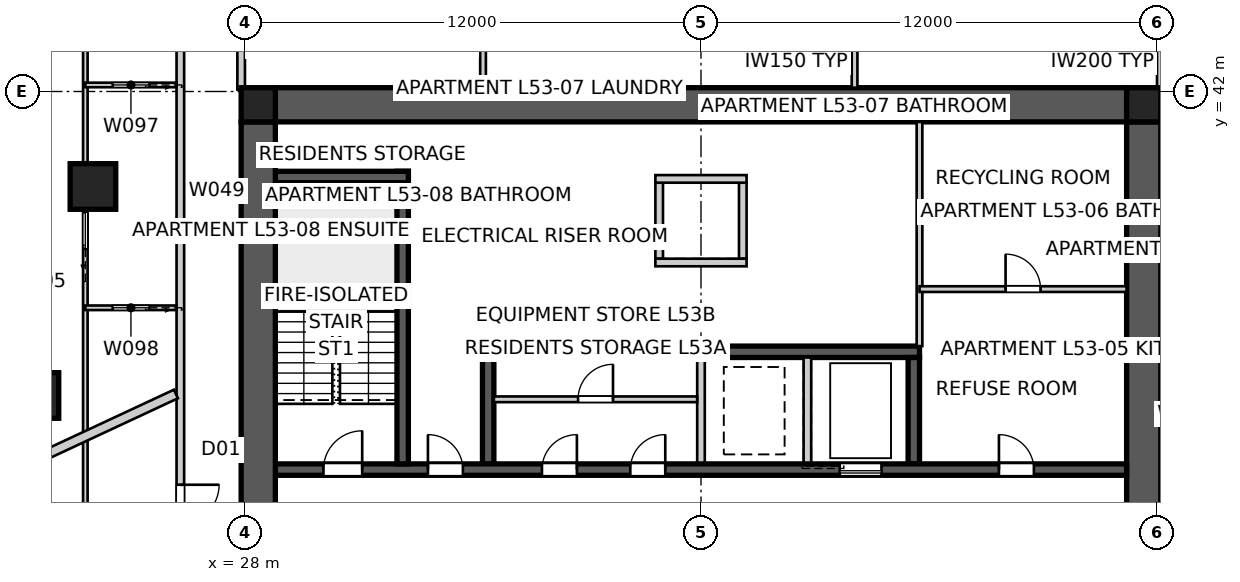
"""IFC4 building model, lengths in metres.
Left out: names, types, materials, properties, quantities, classifications, styles, units other than length and angle.
Written with IfcOpenShell. Run it as: python <this file> out.ifc"""

import sys

from ifc_helpers import new_model, si_unit, direction, frame, frame_2d, origin, origin_2d, place, context, subcontext, project, spatial, polyline, rectangle, outline, extrude, element, fill, save


model = new_model("IFC4")
c1 = context("Model", 3, precision=1e-05, world=origin(), true_north=direction((0.0, 1.0)))
c2 = subcontext(c1, "Body", "Model", "MODEL_VIEW")
j1 = project(units=[si_unit("LENGTHUNIT", "METRE"), si_unit("PLANEANGLEUNIT", "RADIAN")], contexts=[c1])
p1 = place(None, origin())
s1 = spatial("IfcSite", under=j1, at=p1, CompositionType="ELEMENT")
p2 = place(p1, origin())
s2 = spatial("IfcBuilding", under=s1, at=p2, CompositionType="ELEMENT")
p3 = place(p2, frame((0.0, 0.0, 193.0)))
s3 = spatial("IfcBuildingStorey", under=s2, at=p3, CompositionType="ELEMENT", Elevation=193.0)
p4 = place(p3, frame((28.8, 41.65, 0.0), z_axis=(0.0, 0.0, 1.0), x_axis=(1.0, 0.0, 0.0)))
e1 = element("IfcWall", 1, at=p4, inside=s3, PredefinedType="SHEAR", context=c2, shape_type="SweptSolid", body=[
    extrude(outline(polyline([(0.0, -0.45), (22.4, -0.45), (22.4, -0.025), (22.85, -0.025), (22.85, 0.025), (22.4, 0.025), (22.4, 0.45), (0.0, 0.45), (0.0, 0.025), (-0.45, 0.025), (-0.45, -0.025), (0.0, -0.025), (0.0, -0.45)])), origin(), (0.0, 0.0, 1.0), 3.4),
])
p5 = place(p3, frame((51.65, 18.8, 0.0), z_axis=(0.0, 0.0, 1.0), x_axis=(0.0, 1.0, 0.0)))
e2 = element("IfcWall", 2, at=p5, inside=s3, PredefinedType="SHEAR", context=c2, shape_type="SweptSolid", body=[
    extrude(outline(polyline([(0.0, -0.45), (22.4, -0.45), (22.4, -0.025), (22.85, -0.025), (22.85, 0.025), (22.4, 0.025), (22.4, 0.45), (0.0, 0.45), (0.0, 0.025), (-0.45, 0.025), (-0.45, -0.025), (0.0, -0.025), (0.0, -0.45)])), origin(), (0.0, 0.0, 1.0), 3.4),
])
p6 = place(p5, frame((11.14, 0.0, 0.0)))
e3 = element("IfcOpeningElement", 3, at=p6, cuts=e2, PredefinedType="OPENING", context=c2, shape_type="SweptSolid", body=[
    extrude(rectangle(XDim=1.02, YDim=2.4, at=frame_2d((0.51, 1.2))), frame((0.0, 0.46, 0.0), z_axis=(0.0, -1.0, 0.0), x_axis=(1.0, 0.0, 0.0)), (0.0, 0.0, 1.0), 0.92),
])
p7 = place(p3, frame((28.35, 41.2, 0.0), z_axis=(0.0, 0.0, 1.0), x_axis=(0.0, -1.0, 0.0)))
e4 = element("IfcWall", 4, at=p7, inside=s3, PredefinedType="SHEAR", context=c2, shape_type="SweptSolid", body=[
    extrude(outline(polyline([(0.0, -0.45), (22.4, -0.45), (22.4, -0.025), (22.85, -0.025), (22.85, 0.025), (22.4, 0.025), (22.4, 0.45), (0.0, 0.45), (0.0, 0.025), (-0.45, 0.025), (-0.45, -0.025), (0.0, -0.025), (0.0, -0.45)])), origin(), (0.0, 0.0, 1.0), 3.4),
])
p8 = place(p7, frame((11.14, 0.0, 0.0)))
e5 = element("IfcOpeningElement", 5, at=p8, cuts=e4, PredefinedType="OPENING", context=c2, shape_type="SweptSolid", body=[
    extrude(rectangle(XDim=1.02, YDim=2.4, at=frame_2d((0.51, 1.2))), frame((0.0, 0.46, 0.0), z_axis=(0.0, -1.0, 0.0), x_axis=(1.0, 0.0, 0.0)), (0.0, 0.0, 1.0), 0.92),
])
p9 = place(p3, frame((28.8, 32.05, 0.0), z_axis=(0.0, 0.0, 1.0), x_axis=(1.0, 0.0, 0.0)))
e6 = element("IfcWall", 6, at=p9, inside=s3, PredefinedType="SHEAR", context=c2, shape_type="SweptSolid", body=[
    extrude(rectangle(XDim=22.4, YDim=0.3, at=frame_2d((11.2, 0.0))), origin(), (0.0, 0.0, 1.0), 3.4),
])
p10 = place(p9, frame((19.04, 0.0, 0.0)))
e7 = element("IfcOpeningElement", 7, at=p10, cuts=e6, PredefinedType="OPENING", context=c2, shape_type="SweptSolid", body=[
    extrude(rectangle(XDim=0.92, YDim=2.1, at=frame_2d((0.46, 1.05))), frame((0.0, 0.16, 0.0), z_axis=(0.0, -1.0, 0.0), x_axis=(1.0, 0.0, 0.0)), (0.0, 0.0, 1.0), 0.32),
])
p11 = place(p9, frame((1.265, 0.0, 0.0)))
e8 = element("IfcOpeningElement", 8, at=p11, cuts=e6, PredefinedType="OPENING", context=c2, shape_type="SweptSolid", body=[
    extrude(rectangle(XDim=1.02, YDim=2.1, at=frame_2d((0.51, 1.05))), frame((0.0, 0.16, 0.0), z_axis=(0.0, -1.0, 0.0), x_axis=(1.0, 0.0, 0.0)), (0.0, 0.0, 1.0), 0.32),
])
p12 = place(p9, frame((4.015, 0.0, 0.0)))
e9 = element("IfcOpeningElement", 9, at=p12, cuts=e6, PredefinedType="OPENING", context=c2, shape_type="SweptSolid", body=[
    extrude(rectangle(XDim=0.92, YDim=2.1, at=frame_2d((0.46, 1.05))), frame((0.0, 0.16, 0.0), z_axis=(0.0, -1.0, 0.0), x_axis=(1.0, 0.0, 0.0)), (0.0, 0.0, 1.0), 0.32),
])
p13 = place(p9, frame((7.015, 0.0, 0.0)))
e10 = element("IfcOpeningElement", 10, at=p13, cuts=e6, PredefinedType="OPENING", context=c2, shape_type="SweptSolid", body=[
    extrude(rectangle(XDim=0.92, YDim=2.1, at=frame_2d((0.46, 1.05))), frame((0.0, 0.16, 0.0), z_axis=(0.0, -1.0, 0.0), x_axis=(1.0, 0.0, 0.0)), (0.0, 0.0, 1.0), 0.32),
])
p14 = place(p9, frame((9.34, 0.0, 0.0)))
e11 = element("IfcOpeningElement", 11, at=p14, cuts=e6, PredefinedType="OPENING", context=c2, shape_type="SweptSolid", body=[
    extrude(rectangle(XDim=0.92, YDim=2.1, at=frame_2d((0.46, 1.05))), frame((0.0, 0.16, 0.0), z_axis=(0.0, -1.0, 0.0), x_axis=(1.0, 0.0, 0.0)), (0.0, 0.0, 1.0), 0.32),
])
p15 = place(p9, frame((14.85, 0.0, 0.0)))
e12 = element("IfcOpeningElement", 12, at=p15, cuts=e6, PredefinedType="OPENING", context=c2, shape_type="SweptSolid", body=[
    extrude(rectangle(XDim=1.1, YDim=2.1, at=frame_2d((0.55, 1.05))), frame((0.0, 0.16, 0.0), z_axis=(0.0, -1.0, 0.0), x_axis=(1.0, 0.0, 0.0)), (0.0, 0.0, 1.0), 0.32),
])
p16 = place(p3, frame((34.25, 35.15, 0.0), z_axis=(0.0, 0.0, 1.0), x_axis=(1.0, 0.0, 0.0)))
e13 = element("IfcWall", 13, at=p16, inside=s3, PredefinedType="SHEAR", context=c2, shape_type="SweptSolid", body=[
    extrude(rectangle(XDim=11.5, YDim=0.3, at=frame_2d((5.75, 0.0))), origin(), (0.0, 0.0, 1.0), 3.4),
])
p17 = place(p3, frame((34.4, 32.2, 0.0), z_axis=(0.0, 0.0, 1.0), x_axis=(0.0, 1.0, 0.0)))
e14 = element("IfcWall", 14, at=p17, inside=s3, PredefinedType="SHEAR", context=c2, shape_type="SweptSolid", body=[
    extrude(rectangle(XDim=2.8, YDim=0.3, at=frame_2d((1.4, 0.0))), origin(), (0.0, 0.0, 1.0), 3.4),
])
for number, where, z_axis, x_axis in (
    (15, (40.0, 32.2, 0.0), (0.0, 0.0, 1.0), (0.0, 1.0, 0.0)),
    (16, (42.8, 32.2, 0.0), (0.0, 0.0, 1.0), (0.0, 1.0, 0.0)),
):
    element("IfcWall", number, at=place(p3, frame(where, z_axis=z_axis, x_axis=x_axis)), inside=s3, PredefinedType="SOLIDWALL", context=c2, shape_type="SweptSolid", body=[
        extrude(rectangle(XDim=2.8, YDim=0.2, at=frame_2d((1.4, 0.0))), origin(), (0.0, 0.0, 1.0), 3.4),
    ])
p18 = place(p3, frame((45.6, 32.2, 0.0), z_axis=(0.0, 0.0, 1.0), x_axis=(0.0, 1.0, 0.0)))
e17 = element("IfcWall", 17, at=p18, inside=s3, PredefinedType="SHEAR", context=c2, shape_type="SweptSolid", body=[
    extrude(rectangle(XDim=2.8, YDim=0.3, at=frame_2d((1.4, 0.0))), origin(), (0.0, 0.0, 1.0), 3.4),
])
p19 = place(p3, frame((32.15, 32.2, 0.0), z_axis=(0.0, 0.0, 1.0), x_axis=(0.0, 1.0, 0.0)))
e18 = element("IfcWall", 18, at=p19, inside=s3, PredefinedType="SHEAR", context=c2, shape_type="SweptSolid", body=[
    extrude(rectangle(XDim=7.7, YDim=0.3, at=frame_2d((3.85, 0.0))), origin(), (0.0, 0.0, 1.0), 3.4),
])
p20 = place(p3, frame((28.8, 39.75, 0.0), z_axis=(0.0, 0.0, 1.0), x_axis=(1.0, 0.0, 0.0)))
e19 = element("IfcWall", 19, at=p20, inside=s3, PredefinedType="SHEAR", context=c2, shape_type="SweptSolid", body=[
    extrude(rectangle(XDim=3.5, YDim=0.3, at=frame_2d((1.75, 0.0))), origin(), (0.0, 0.0, 1.0), 3.4),
])
for number, where, z_axis, x_axis in (
    (20, (38.9, 37.6, 0.0), (0.0, 0.0, 1.0), (0.0, 1.0, 0.0)),
    (21, (41.1, 37.6, 0.0), (0.0, 0.0, 1.0), (0.0, 1.0, 0.0)),
):
    element("IfcWall", number, at=place(p3, frame(where, z_axis=z_axis, x_axis=x_axis)), inside=s3, PredefinedType="SOLIDWALL", context=c2, shape_type="SweptSolid", body=[
        extrude(rectangle(XDim=2.0, YDim=0.2, at=frame_2d((1.0, 0.0))), origin(), (0.0, 0.0, 1.0), 3.4),
    ])
for number, where, z_axis, x_axis in (
    (22, (38.8, 37.5, 0.0), (0.0, 0.0, 1.0), (1.0, 0.0, 0.0)),
    (23, (38.8, 39.7, 0.0), (0.0, 0.0, 1.0), (1.0, 0.0, 0.0)),
):
    element("IfcWall", number, at=place(p3, frame(where, z_axis=z_axis, x_axis=x_axis)), inside=s3, PredefinedType="SOLIDWALL", context=c2, shape_type="SweptSolid", body=[
        extrude(rectangle(XDim=2.4, YDim=0.2, at=frame_2d((1.2, 0.0))), origin(), (0.0, 0.0, 1.0), 3.4),
    ])
for number, where, z_axis, x_axis in (
    (24, (51.65, 41.65, 0.0), (0.0, 0.0, 1.0), (1.0, 0.0, 0.0)),
    (25, (28.35, 41.65, 0.0), (0.0, 0.0, 1.0), (1.0, 0.0, 0.0)),
):
    element("IfcColumn", number, at=place(p3, frame(where, z_axis=z_axis, x_axis=x_axis)), inside=s3, PredefinedType="COLUMN", context=c2, shape_type="SweptSolid", body=[
        extrude(rectangle(XDim=0.9, YDim=0.9, at=origin_2d()), origin(), (0.0, 0.0, 1.0), 3.4),
    ])
for number, where, z_axis, x_axis in (
    (26, (24.0, 39.5, 0.0), (0.0, 0.0, 1.0), (1.0, 0.0, 0.0)),
    (27, (22.5, 34.0, 0.0), (0.0, 0.0, 1.0), (1.0, 0.0, 0.0)),
):
    element("IfcColumn", number, at=place(p3, frame(where, z_axis=z_axis, x_axis=x_axis)), inside=s3, PredefinedType="COLUMN", context=c2, shape_type="SweptSolid", body=[
        extrude(rectangle(XDim=1.2, YDim=1.2, at=origin_2d()), origin(), (0.0, 0.0, 1.0), 3.4),
    ])
p21 = place(p3, frame((26.3, 47.1, 0.0), z_axis=(0.0, 0.0, 1.0), x_axis=(0.0, -1.0, 0.0)))
e28 = element("IfcWall", 28, at=p21, inside=s3, PredefinedType="PARTITIONING", context=c2, shape_type="SweptSolid", body=[
    extrude(rectangle(XDim=33.8, YDim=0.2, at=frame_2d((16.9, 0.0))), origin(), (0.0, 0.0, 1.0), 3.25),
])
p22 = place(p21, frame((15.449, 0.0, 0.0)))
e29 = element("IfcOpeningElement", 29, at=p22, cuts=e28, PredefinedType="OPENING", context=c2, shape_type="SweptSolid", body=[
    extrude(rectangle(XDim=1.02, YDim=2.34, at=frame_2d((0.51, 1.17))), frame((0.0, 0.11, 0.0), z_axis=(0.0, -1.0, 0.0), x_axis=(1.0, 0.0, 0.0)), (0.0, 0.0, 1.0), 0.22),
])
p23 = place(p21, frame((30.883, 0.0, 0.0)))
e30 = element("IfcOpeningElement", 30, at=p23, cuts=e28, PredefinedType="OPENING", context=c2, shape_type="SweptSolid", body=[
    extrude(rectangle(XDim=1.02, YDim=2.34, at=frame_2d((0.51, 1.17))), frame((0.0, 0.11, 0.0), z_axis=(0.0, -1.0, 0.0), x_axis=(1.0, 0.0, 0.0)), (0.0, 0.0, 1.0), 0.22),
])
p24 = place(p3, frame((15.14, 28.89, 0.0), z_axis=(0.0, 0.0, 1.0), x_axis=(0.906303906082, 0.422626584374, 0.0)))
e31 = element("IfcWall", 31, at=p24, inside=s3, PredefinedType="PARTITIONING", context=c2, shape_type="SweptSolid", body=[
    extrude(rectangle(XDim=12.185, YDim=0.25, at=frame_2d((6.092, 0.0))), origin(), (0.0, 0.0, 1.0), 3.25),
])
p25 = place(p3, frame((45.75, 41.2, 0.0), z_axis=(0.0, 0.0, 1.0), x_axis=(0.0, -1.0, 0.0)))
e32 = element("IfcWall", 32, at=p25, inside=s3, PredefinedType="SOLIDWALL", context=c2, shape_type="SweptSolid", body=[
    extrude(rectangle(XDim=5.9, YDim=0.15, at=frame_2d((2.95, 0.0))), origin(), (0.0, 0.0, 1.0), 3.25),
])
p26 = place(p3, frame((45.75, 36.8, 0.0), z_axis=(0.0, 0.0, 1.0), x_axis=(1.0, 0.0, 0.0)))
e33 = element("IfcWall", 33, at=p26, inside=s3, PredefinedType="SOLIDWALL", context=c2, shape_type="SweptSolid", body=[
    extrude(rectangle(XDim=5.45, YDim=0.15, at=frame_2d((2.725, 0.0))), origin(), (0.0, 0.0, 1.0), 3.25),
])
p27 = place(p26, frame((2.265, 0.0, 0.0)))
e34 = element("IfcOpeningElement", 34, at=p27, cuts=e33, PredefinedType="OPENING", context=c2, shape_type="SweptSolid", body=[
    extrude(rectangle(XDim=0.92, YDim=2.1, at=frame_2d((0.46, 1.05))), frame((0.0, 0.085, 0.0), z_axis=(0.0, -1.0, 0.0), x_axis=(1.0, 0.0, 0.0)), (0.0, 0.0, 1.0), 0.17),
])
p28 = place(p3, frame((27.9, 44.35, 0.0), z_axis=(0.0, 0.0, 1.0), x_axis=(0.0, -1.0, 0.0)))
e35 = element("IfcWall", 35, at=p28, inside=s3, PredefinedType="PARTITIONING", context=c2, shape_type="SweptSolid", body=[
    extrude(rectangle(XDim=2.3, YDim=0.2, at=frame_2d((1.15, 0.0))), origin(), (0.0, 0.0, 1.0), 3.25),
])
p29 = place(p3, frame((52.1, 41.18, 0.0), z_axis=(0.0, 0.0, 1.0), x_axis=(0.0, 1.0, 0.0)))
e36 = element("IfcWall", 36, at=p29, inside=s3, PredefinedType="PARTITIONING", context=c2, shape_type="SweptSolid", body=[
    extrude(rectangle(XDim=3.17, YDim=0.2, at=frame_2d((1.585, 0.0))), origin(), (0.0, 0.0, 1.0), 3.25),
])
p30 = place(p3, frame((34.265, 42.1, 0.0), z_axis=(0.0, 0.0, 1.0), x_axis=(0.0, 1.0, 0.0)))
e37 = element("IfcWall", 37, at=p30, inside=s3, PredefinedType="SOLIDWALL", context=c2, shape_type="SweptSolid", body=[
    extrude(rectangle(XDim=2.25, YDim=0.15, at=frame_2d((1.125, 0.0))), origin(), (0.0, 0.0, 1.0), 2.796),
])
p31 = place(p3, frame((44.042, 42.1, 0.0), z_axis=(0.0, 0.0, 1.0), x_axis=(0.0, 1.0, 0.0)))
e38 = element("IfcWall", 38, at=p31, inside=s3, PredefinedType="SOLIDWALL", context=c2, shape_type="SweptSolid", body=[
    extrude(rectangle(XDim=2.25, YDim=0.15, at=frame_2d((1.125, 0.0))), origin(), (0.0, 0.0, 1.0), 3.25),
])
p32 = place(p3, frame((23.8, 17.205, 0.0), z_axis=(0.0, 0.0, 1.0), x_axis=(0.0, 1.0, 0.0)))
e39 = element("IfcWall", 39, at=p32, inside=s3, PredefinedType="PARTITIONING", context=c2, shape_type="SweptSolid", body=[
    extrude(rectangle(XDim=30.574, YDim=0.12, at=frame_2d((15.287, 0.0))), origin(), (0.0, 0.0, 1.0), 2.55),
])
p33 = place(p32, frame((12.857, 0.0, 0.0)))
e40 = element("IfcOpeningElement", 40, at=p33, cuts=e39, PredefinedType="OPENING", context=c2, shape_type="SweptSolid", body=[
    extrude(rectangle(XDim=0.92, YDim=2.34, at=frame_2d((0.46, 1.17))), frame((0.0, 0.07, 0.0), z_axis=(0.0, -1.0, 0.0), x_axis=(1.0, 0.0, 0.0)), (0.0, 0.0, 1.0), 0.14),
])
p34 = place(p32, frame((28.042, 0.0, 0.0)))
e41 = element("IfcOpeningElement", 41, at=p34, cuts=e39, PredefinedType="OPENING", context=c2, shape_type="SweptSolid", body=[
    extrude(rectangle(XDim=0.92, YDim=2.34, at=frame_2d((0.46, 1.17))), frame((0.0, 0.07, 0.0), z_axis=(0.0, -1.0, 0.0), x_axis=(1.0, 0.0, 0.0)), (0.0, 0.0, 1.0), 0.14),
])
p35 = place(p32, frame((20.655, 0.0, 0.0)))
e42 = element("IfcOpeningElement", 42, at=p35, cuts=e39, PredefinedType="OPENING", context=c2, shape_type="SweptSolid", body=[
    extrude(rectangle(XDim=0.96, YDim=2.1, at=frame_2d((0.48, 1.05))), frame((0.0, 0.07, 0.0), z_axis=(0.0, -1.0, 0.0), x_axis=(1.0, 0.0, 0.0)), (0.0, 0.0, 1.0), 0.14),
])
p36 = place(p3, frame((26.2, 42.172, 0.0), z_axis=(0.0, 0.0, 1.0), x_axis=(-1.0, 0.0, 0.0)))
e43 = element("IfcWall", 43, at=p36, inside=s3, PredefinedType="PARTITIONING", context=c2, shape_type="SweptSolid", body=[
    extrude(rectangle(XDim=2.4, YDim=0.12, at=frame_2d((1.2, 0.0))), origin(), (0.0, 0.0, 1.0), 3.25),
])
p37 = place(p36, frame((0.72, 0.0, 0.0)))
e44 = element("IfcOpeningElement", 44, at=p37, cuts=e43, PredefinedType="OPENING", context=c2, shape_type="SweptSolid", body=[
    extrude(rectangle(XDim=0.96, YDim=2.1, at=frame_2d((0.48, 1.05))), frame((0.0, 0.07, 0.0), z_axis=(0.0, -1.0, 0.0), x_axis=(1.0, 0.0, 0.0)), (0.0, 0.0, 1.0), 0.14),
])
p38 = place(p3, frame((26.2, 36.308, 0.0), z_axis=(0.0, 0.0, 1.0), x_axis=(-1.0, 0.0, 0.0)))
e45 = element("IfcWall", 45, at=p38, inside=s3, PredefinedType="PARTITIONING", context=c2, shape_type="SweptSolid", body=[
    extrude(rectangle(XDim=2.4, YDim=0.12, at=frame_2d((1.2, 0.0))), origin(), (0.0, 0.0, 1.0), 3.25),
])
p39 = place(p38, frame((0.72, 0.0, 0.0)))
e46 = element("IfcOpeningElement", 46, at=p39, cuts=e45, PredefinedType="OPENING", context=c2, shape_type="SweptSolid", body=[
    extrude(rectangle(XDim=0.96, YDim=2.1, at=frame_2d((0.48, 1.05))), frame((0.0, 0.07, 0.0), z_axis=(0.0, -1.0, 0.0), x_axis=(1.0, 0.0, 0.0)), (0.0, 0.0, 1.0), 0.14),
])
p40 = place(p3, frame((18.965, 41.391, 0.0), z_axis=(0.0, 0.0, 1.0), x_axis=(0.906312880264, 0.422607339108, 0.0)))
e47 = element("IfcWall", 47, at=p40, inside=s3, PredefinedType="PARTITIONING", context=c2, shape_type="SweptSolid", body=[
    extrude(rectangle(XDim=5.334, YDim=0.12, at=frame_2d((2.667, 0.0))), origin(), (0.0, 0.0, 1.0), 3.25),
])
p41 = place(p3, frame((34.55, 33.9, 0.0), z_axis=(0.0, 0.0, 1.0), x_axis=(1.0, 0.0, 0.0)))
e48 = element("IfcWall", 48, at=p41, inside=s3, PredefinedType="SOLIDWALL", context=c2, shape_type="SweptSolid", body=[
    extrude(rectangle(XDim=5.35, YDim=0.15, at=frame_2d((2.675, 0.0))), origin(), (0.0, 0.0, 1.0), 3.25),
])
p42 = place(p41, frame((2.215, 0.0, 0.0)))
e49 = element("IfcOpeningElement", 49, at=p42, cuts=e48, PredefinedType="OPENING", context=c2, shape_type="SweptSolid", body=[
    extrude(rectangle(XDim=0.92, YDim=2.1, at=frame_2d((0.46, 1.05))), frame((0.0, 0.085, 0.0), z_axis=(0.0, -1.0, 0.0), x_axis=(1.0, 0.0, 0.0)), (0.0, 0.0, 1.0), 0.17),
])
p43 = place(p10, origin())
e50 = element("IfcDoor", 50, at=p43, inside=s3, OperationType="SINGLE_SWING_LEFT", PredefinedType="DOOR", context=c2, shape_type="SweptSolid", body=[
    extrude(rectangle(XDim=0.92, YDim=2.1, at=frame_2d((0.46, 1.05))), frame((0.0, 0.025, 0.0), z_axis=(0.0, -1.0, 0.0), x_axis=(1.0, 0.0, 0.0)), (0.0, 0.0, 1.0), 0.05),
])
fill(e7, e50)
p44 = place(p11, origin())
e51 = element("IfcDoor", 51, at=p44, inside=s3, OperationType="SINGLE_SWING_RIGHT", PredefinedType="DOOR", context=c2, shape_type="SweptSolid", body=[
    extrude(rectangle(XDim=1.02, YDim=2.1, at=frame_2d((0.51, 1.05))), frame((0.0, 0.025, 0.0), z_axis=(0.0, -1.0, 0.0), x_axis=(1.0, 0.0, 0.0)), (0.0, 0.0, 1.0), 0.05),
])
fill(e8, e51)
p45 = place(p12, origin())
e52 = element("IfcDoor", 52, at=p45, inside=s3, OperationType="SINGLE_SWING_LEFT", PredefinedType="DOOR", context=c2, shape_type="SweptSolid", body=[
    extrude(rectangle(XDim=0.92, YDim=2.1, at=frame_2d((0.46, 1.05))), frame((0.0, 0.025, 0.0), z_axis=(0.0, -1.0, 0.0), x_axis=(1.0, 0.0, 0.0)), (0.0, 0.0, 1.0), 0.05),
])
fill(e9, e52)
p46 = place(p22, origin())
e53 = element("IfcDoor", 53, at=p46, inside=s3, OperationType="SINGLE_SWING_LEFT", PredefinedType="DOOR", context=c2, shape_type="SweptSolid", body=[
    extrude(rectangle(XDim=1.02, YDim=2.34, at=frame_2d((0.51, 1.17))), frame((0.0, 0.025, 0.0), z_axis=(0.0, -1.0, 0.0), x_axis=(1.0, 0.0, 0.0)), (0.0, 0.0, 1.0), 0.05),
])
fill(e29, e53)
p47 = place(p27, origin())
e54 = element("IfcDoor", 54, at=p47, inside=s3, OperationType="SINGLE_SWING_LEFT", PredefinedType="DOOR", context=c2, shape_type="SweptSolid", body=[
    extrude(rectangle(XDim=0.92, YDim=2.1, at=frame_2d((0.46, 1.05))), frame((0.0, 0.025, 0.0), z_axis=(0.0, -1.0, 0.0), x_axis=(1.0, 0.0, 0.0)), (0.0, 0.0, 1.0), 0.05),
])
fill(e34, e54)
p48 = place(p37, origin())
e55 = element("IfcDoor", 55, at=p48, inside=s3, OperationType="SLIDING_TO_LEFT", PredefinedType="DOOR", context=c2, shape_type="SweptSolid", body=[
    extrude(rectangle(XDim=0.96, YDim=2.1, at=frame_2d((0.48, 1.05))), frame((0.0, 0.025, 0.0), z_axis=(0.0, -1.0, 0.0), x_axis=(1.0, 0.0, 0.0)), (0.0, 0.0, 1.0), 0.05),
])
fill(e44, e55)
p49 = place(p35, origin())
e56 = element("IfcDoor", 56, at=p49, inside=s3, OperationType="SLIDING_TO_LEFT", PredefinedType="DOOR", context=c2, shape_type="SweptSolid", body=[
    extrude(rectangle(XDim=0.96, YDim=2.1, at=frame_2d((0.48, 1.05))), frame((0.0, 0.025, 0.0), z_axis=(0.0, -1.0, 0.0), x_axis=(1.0, 0.0, 0.0)), (0.0, 0.0, 1.0), 0.05),
])
fill(e42, e56)
p50 = place(p39, origin())
e57 = element("IfcDoor", 57, at=p50, inside=s3, OperationType="SLIDING_TO_LEFT", PredefinedType="DOOR", context=c2, shape_type="SweptSolid", body=[
    extrude(rectangle(XDim=0.96, YDim=2.1, at=frame_2d((0.48, 1.05))), frame((0.0, 0.025, 0.0), z_axis=(0.0, -1.0, 0.0), x_axis=(1.0, 0.0, 0.0)), (0.0, 0.0, 1.0), 0.05),
])
fill(e46, e57)
p51 = place(p13, origin())
e58 = element("IfcDoor", 58, at=p51, inside=s3, OperationType="SINGLE_SWING_RIGHT", PredefinedType="DOOR", context=c2, shape_type="SweptSolid", body=[
    extrude(rectangle(XDim=0.92, YDim=2.1, at=frame_2d((0.46, 1.05))), frame((0.0, 0.025, 0.0), z_axis=(0.0, -1.0, 0.0), x_axis=(1.0, 0.0, 0.0)), (0.0, 0.0, 1.0), 0.05),
])
fill(e10, e58)
p52 = place(p14, origin())
e59 = element("IfcDoor", 59, at=p52, inside=s3, OperationType="SINGLE_SWING_RIGHT", PredefinedType="DOOR", context=c2, shape_type="SweptSolid", body=[
    extrude(rectangle(XDim=0.92, YDim=2.1, at=frame_2d((0.46, 1.05))), frame((0.0, 0.025, 0.0), z_axis=(0.0, -1.0, 0.0), x_axis=(1.0, 0.0, 0.0)), (0.0, 0.0, 1.0), 0.05),
])
fill(e11, e59)
p53 = place(p42, origin())
e60 = element("IfcDoor", 60, at=p53, inside=s3, OperationType="SINGLE_SWING_RIGHT", PredefinedType="DOOR", context=c2, shape_type="SweptSolid", body=[
    extrude(rectangle(XDim=0.92, YDim=2.1, at=frame_2d((0.46, 1.05))), frame((0.0, 0.025, 0.0), z_axis=(0.0, -1.0, 0.0), x_axis=(1.0, 0.0, 0.0)), (0.0, 0.0, 1.0), 0.05),
])
fill(e49, e60)
p54 = place(p15, origin())
e61 = element("IfcDoor", 61, at=p54, inside=s3, OperationType="SLIDING_TO_LEFT", PredefinedType="DOOR", context=c2, shape_type="SweptSolid", body=[
    extrude(rectangle(XDim=1.1, YDim=2.1, at=frame_2d((0.55, 1.05))), frame((0.0, 0.025, 0.0), z_axis=(0.0, -1.0, 0.0), x_axis=(1.0, 0.0, 0.0)), (0.0, 0.0, 1.0), 0.05),
])
fill(e12, e61)
save(model, sys.argv[1])
